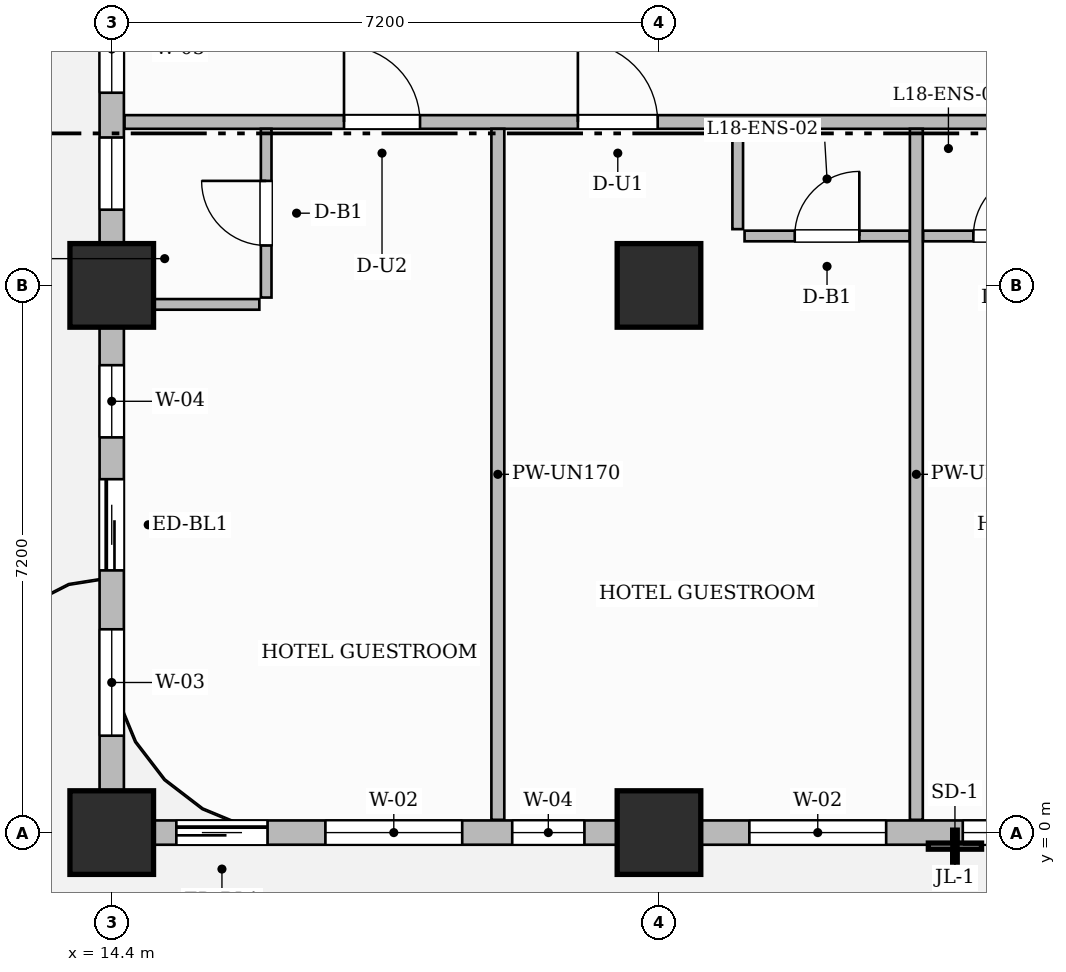
"""IFC4 building model, lengths in metres.
Left out: names, types, materials, properties, quantities, classifications, styles, units other than length and angle.
Written with IfcOpenShell. Run it as: python <this file> out.ifc"""

import sys

from ifc_helpers import new_model, si_unit, direction, frame, frame_2d, origin, origin_2d, place, context, subcontext, project, spatial, rectangle, extrude, source, transform, mapped, element, fill, save


model = new_model("IFC4")
c1 = context("Model", 3, precision=1e-05, world=origin(), true_north=direction((0.0, 1.0)))
c2 = subcontext(c1, "Body", "Model", "MODEL_VIEW")
j1 = project(units=[si_unit("LENGTHUNIT", "METRE"), si_unit("PLANEANGLEUNIT", "RADIAN")], contexts=[c1])
p1 = place(None, origin())
s1 = spatial("IfcSite", under=j1, at=p1, CompositionType="ELEMENT")
p2 = place(p1, origin())
s2 = spatial("IfcBuilding", under=s1, at=p2, CompositionType="ELEMENT")
p3 = place(p2, frame((0.0, 0.0, 76.8)))
s3 = spatial("IfcBuildingStorey", under=s2, at=p3, CompositionType="ELEMENT", Elevation=76.8)
m1 = source(origin(), c2, "Body", "SweptSolid", [
    extrude(rectangle(XDim=1.1, YDim=1.1, at=origin_2d()), origin(), (0.0, 0.0, 1.0), 3.7),
])
for number, where, z_axis, x_axis in (
    (1, (14.4, 0.0, 0.0), (0.0, 0.0, 1.0), (1.0, 0.0, 0.0)),
    (2, (14.4, 7.2, 0.0), (0.0, 0.0, 1.0), (1.0, 0.0, 0.0)),
    (3, (21.6, 0.0, 0.0), (0.0, 0.0, 1.0), (1.0, 0.0, 0.0)),
    (4, (21.6, 7.2, 0.0), (0.0, 0.0, 1.0), (1.0, 0.0, 0.0)),
):
    element("IfcColumn", number, at=place(p3, frame(where, z_axis=z_axis, x_axis=x_axis)), inside=s3, PredefinedType="COLUMN", context=c2, shape_type="MappedRepresentation", body=[
        mapped(m1, transform((0.0, 0.0, 0.0), scale=1.0)),
    ])
p4 = place(p3, frame((14.568, 9.35, 0.0), z_axis=(0.0, 0.0, 1.0), x_axis=(1.0, 0.0, 0.0)))
e5 = element("IfcWall", 5, at=p4, inside=s3, PredefinedType="PARTITIONING", context=c2, shape_type="SweptSolid", body=[
    extrude(rectangle(XDim=15.542, YDim=0.18, at=frame_2d((7.771, 0.0))), origin(), (0.0, 0.0, 1.0), 3.45),
])
p5 = place(p4, frame((2.888, 0.0, 0.0)))
e6 = element("IfcOpeningElement", 6, at=p5, cuts=e5, PredefinedType="OPENING", context=c2, shape_type="SweptSolid", body=[
    extrude(rectangle(XDim=1.0, YDim=2.2, at=frame_2d((0.5, 1.1))), frame((0.0, 0.1, 0.0), z_axis=(0.0, -1.0, 0.0), x_axis=(1.0, 0.0, 0.0)), (0.0, 0.0, 1.0), 0.2),
])
p6 = place(p4, frame((5.965, 0.0, 0.0)))
e7 = element("IfcOpeningElement", 7, at=p6, cuts=e5, PredefinedType="OPENING", context=c2, shape_type="SweptSolid", body=[
    extrude(rectangle(XDim=1.05, YDim=2.25, at=frame_2d((0.525, 1.125))), frame((0.0, 0.1, 0.0), z_axis=(0.0, -1.0, 0.0), x_axis=(1.0, 0.0, 0.0)), (0.0, 0.0, 1.0), 0.2),
])
p7 = place(p4, frame((13.7, 0.0, 0.0)))
e8 = element("IfcOpeningElement", 8, at=p7, cuts=e5, PredefinedType="OPENING", context=c2, shape_type="SweptSolid", body=[
    extrude(rectangle(XDim=1.0, YDim=2.2, at=frame_2d((0.5, 1.1))), frame((0.0, 0.1, 0.0), z_axis=(0.0, -1.0, 0.0), x_axis=(1.0, 0.0, 0.0)), (0.0, 0.0, 1.0), 0.2),
])
p8 = place(p3, frame((19.48, 0.168, 0.0), z_axis=(0.0, 0.0, 1.0), x_axis=(0.0, 1.0, 0.0)))
e9 = element("IfcWall", 9, at=p8, inside=s3, PredefinedType="PARTITIONING", context=c2, shape_type="SweptSolid", body=[
    extrude(rectangle(XDim=9.092, YDim=0.17, at=frame_2d((4.546, 0.0))), origin(), (0.0, 0.0, 1.0), 3.45),
])
p9 = place(p3, frame((24.986, 0.168, 0.0), z_axis=(0.0, 0.0, 1.0), x_axis=(0.0, 1.0, 0.0)))
e10 = element("IfcWall", 10, at=p9, inside=s3, PredefinedType="PARTITIONING", context=c2, shape_type="SweptSolid", body=[
    extrude(rectangle(XDim=9.092, YDim=0.17, at=frame_2d((4.546, 0.0))), origin(), (0.0, 0.0, 1.0), 3.075),
])
p10 = place(p3, frame((16.432, 7.04, 0.0), z_axis=(0.0, 0.0, 1.0), x_axis=(0.0, 1.0, 0.0)))
e11 = element("IfcWall", 11, at=p10, inside=s3, PredefinedType="PARTITIONING", context=c2, shape_type="SweptSolid", body=[
    extrude(rectangle(XDim=2.22, YDim=0.14, at=frame_2d((1.11, 0.0))), origin(), (0.0, 0.0, 1.0), 3.45),
])
p11 = place(p10, frame((0.685, 0.0, 0.0)))
e12 = element("IfcOpeningElement", 12, at=p11, cuts=e11, PredefinedType="OPENING", context=c2, shape_type="SweptSolid", body=[
    extrude(rectangle(XDim=0.85, YDim=2.1, at=frame_2d((0.425, 1.05))), frame((0.0, 0.08, 0.0), z_axis=(0.0, -1.0, 0.0), x_axis=(1.0, 0.0, 0.0)), (0.0, 0.0, 1.0), 0.16),
])
p12 = place(p3, frame((14.49, 6.95, 0.0), z_axis=(0.0, 0.0, 1.0), x_axis=(1.0, 0.0, 0.0)))
e13 = element("IfcWall", 13, at=p12, inside=s3, PredefinedType="PARTITIONING", context=c2, shape_type="SweptSolid", body=[
    extrude(rectangle(XDim=1.852, YDim=0.14, at=frame_2d((0.926, 0.0))), origin(), (0.0, 0.0, 1.0), 2.885),
])
p13 = place(p3, frame((22.636, 7.94, 0.0), z_axis=(0.0, 0.0, 1.0), x_axis=(0.0, 1.0, 0.0)))
e14 = element("IfcWall", 14, at=p13, inside=s3, PredefinedType="PARTITIONING", context=c2, shape_type="SweptSolid", body=[
    extrude(rectangle(XDim=1.32, YDim=0.14, at=frame_2d((0.66, 0.0))), origin(), (0.0, 0.0, 1.0), 3.45),
])
p14 = place(p3, frame((22.726, 7.85, 0.0), z_axis=(0.0, 0.0, 1.0), x_axis=(1.0, 0.0, 0.0)))
e15 = element("IfcWall", 15, at=p14, inside=s3, PredefinedType="PARTITIONING", context=c2, shape_type="SweptSolid", body=[
    extrude(rectangle(XDim=2.17, YDim=0.14, at=frame_2d((1.085, 0.0))), origin(), (0.0, 0.0, 1.0), 3.45),
])
p15 = place(p14, frame((0.66, 0.0, 0.0)))
e16 = element("IfcOpeningElement", 16, at=p15, cuts=e15, PredefinedType="OPENING", context=c2, shape_type="SweptSolid", body=[
    extrude(rectangle(XDim=0.85, YDim=2.1, at=frame_2d((0.425, 1.05))), frame((0.0, 0.08, 0.0), z_axis=(0.0, -1.0, 0.0), x_axis=(1.0, 0.0, 0.0)), (0.0, 0.0, 1.0), 0.16),
])
p16 = place(p3, frame((25.076, 7.85, 0.0), z_axis=(0.0, 0.0, 1.0), x_axis=(1.0, 0.0, 0.0)))
e17 = element("IfcWall", 17, at=p16, inside=s3, PredefinedType="PARTITIONING", context=c2, shape_type="SweptSolid", body=[
    extrude(rectangle(XDim=2.17, YDim=0.14, at=frame_2d((1.085, 0.0))), origin(), (0.0, 0.0, 1.0), 3.45),
])
p17 = place(p16, frame((0.66, 0.0, 0.0)))
e18 = element("IfcOpeningElement", 18, at=p17, cuts=e17, PredefinedType="OPENING", context=c2, shape_type="SweptSolid", body=[
    extrude(rectangle(XDim=0.85, YDim=2.1, at=frame_2d((0.425, 1.05))), frame((0.0, 0.08, 0.0), z_axis=(0.0, -1.0, 0.0), x_axis=(1.0, 0.0, 0.0)), (0.0, 0.0, 1.0), 0.16),
])
p18 = place(p3, frame((14.4, 0.0, 0.0), z_axis=(0.0, 0.0, 1.0), x_axis=(1.0, 0.0, 0.0)))
e19 = element("IfcWall", 19, at=p18, inside=s3, PredefinedType="SOLIDWALL", context=c2, shape_type="SweptSolid", body=[
    extrude(rectangle(XDim=43.2, YDim=0.32, at=frame_2d((21.6, 0.0))), origin(), (0.0, 0.0, 1.0), 2.885),
])
p19 = place(p18, frame((0.85, 0.0, 0.0)))
e20 = element("IfcOpeningElement", 20, at=p19, cuts=e19, PredefinedType="OPENING", context=c2, shape_type="SweptSolid", body=[
    extrude(rectangle(XDim=1.2, YDim=2.2, at=frame_2d((0.6, 1.1))), frame((0.0, 0.17, 0.0), z_axis=(0.0, -1.0, 0.0), x_axis=(1.0, 0.0, 0.0)), (0.0, 0.0, 1.0), 0.34),
])
p20 = place(p18, frame((2.811, 0.0, 0.8)))
e21 = element("IfcOpeningElement", 21, at=p20, cuts=e19, PredefinedType="OPENING", context=c2, shape_type="SweptSolid", body=[
    extrude(rectangle(XDim=1.8, YDim=1.85, at=frame_2d((0.9, 0.925))), frame((0.0, 0.17, 0.0), z_axis=(0.0, -1.0, 0.0), x_axis=(1.0, 0.0, 0.0)), (0.0, 0.0, 1.0), 0.34),
])
p21 = place(p18, frame((5.269, 0.0, 0.8)))
e22 = element("IfcOpeningElement", 22, at=p21, cuts=e19, PredefinedType="OPENING", context=c2, shape_type="SweptSolid", body=[
    extrude(rectangle(XDim=0.95, YDim=1.75, at=frame_2d((0.475, 0.875))), frame((0.0, 0.17, 0.0), z_axis=(0.0, -1.0, 0.0), x_axis=(1.0, 0.0, 0.0)), (0.0, 0.0, 1.0), 0.34),
])
p22 = place(p18, frame((8.389, 0.0, 0.8)))
e23 = element("IfcOpeningElement", 23, at=p22, cuts=e19, PredefinedType="OPENING", context=c2, shape_type="SweptSolid", body=[
    extrude(rectangle(XDim=1.8, YDim=1.85, at=frame_2d((0.9, 0.925))), frame((0.0, 0.17, 0.0), z_axis=(0.0, -1.0, 0.0), x_axis=(1.0, 0.0, 0.0)), (0.0, 0.0, 1.0), 0.34),
])
p23 = place(p18, frame((11.197, 0.0, 0.8)))
e24 = element("IfcOpeningElement", 24, at=p23, cuts=e19, PredefinedType="OPENING", context=c2, shape_type="SweptSolid", body=[
    extrude(rectangle(XDim=1.8, YDim=1.85, at=frame_2d((0.9, 0.925))), frame((0.0, 0.17, 0.0), z_axis=(0.0, -1.0, 0.0), x_axis=(1.0, 0.0, 0.0)), (0.0, 0.0, 1.0), 0.34),
])
p24 = place(p18, frame((16.804, 0.0, 0.8)))
e25 = element("IfcOpeningElement", 25, at=p24, cuts=e19, PredefinedType="OPENING", context=c2, shape_type="SweptSolid", body=[
    extrude(rectangle(XDim=1.8, YDim=1.85, at=frame_2d((0.9, 0.925))), frame((0.0, 0.17, 0.0), z_axis=(0.0, -1.0, 0.0), x_axis=(1.0, 0.0, 0.0)), (0.0, 0.0, 1.0), 0.34),
])
p25 = place(p18, frame((21.521, 0.0, 0.8)))
e26 = element("IfcOpeningElement", 26, at=p25, cuts=e19, PredefinedType="OPENING", context=c2, shape_type="SweptSolid", body=[
    extrude(rectangle(XDim=0.95, YDim=1.75, at=frame_2d((0.475, 0.875))), frame((0.0, 0.17, 0.0), z_axis=(0.0, -1.0, 0.0), x_axis=(1.0, 0.0, 0.0)), (0.0, 0.0, 1.0), 0.34),
])
p26 = place(p18, frame((23.904, 0.0, 0.8)))
e27 = element("IfcOpeningElement", 27, at=p26, cuts=e19, PredefinedType="OPENING", context=c2, shape_type="SweptSolid", body=[
    extrude(rectangle(XDim=1.8, YDim=1.85, at=frame_2d((0.9, 0.925))), frame((0.0, 0.17, 0.0), z_axis=(0.0, -1.0, 0.0), x_axis=(1.0, 0.0, 0.0)), (0.0, 0.0, 1.0), 0.34),
])
p27 = place(p18, frame((29.681, 0.0, 0.8)))
e28 = element("IfcOpeningElement", 28, at=p27, cuts=e19, PredefinedType="OPENING", context=c2, shape_type="SweptSolid", body=[
    extrude(rectangle(XDim=1.8, YDim=1.85, at=frame_2d((0.9, 0.925))), frame((0.0, 0.17, 0.0), z_axis=(0.0, -1.0, 0.0), x_axis=(1.0, 0.0, 0.0)), (0.0, 0.0, 1.0), 0.34),
])
p28 = place(p18, frame((32.327, 0.0, 0.8)))
e29 = element("IfcOpeningElement", 29, at=p28, cuts=e19, PredefinedType="OPENING", context=c2, shape_type="SweptSolid", body=[
    extrude(rectangle(XDim=1.8, YDim=1.85, at=frame_2d((0.9, 0.925))), frame((0.0, 0.17, 0.0), z_axis=(0.0, -1.0, 0.0), x_axis=(1.0, 0.0, 0.0)), (0.0, 0.0, 1.0), 0.34),
])
p29 = place(p18, frame((36.875, 0.0, 0.8)))
e30 = element("IfcOpeningElement", 30, at=p29, cuts=e19, PredefinedType="OPENING", context=c2, shape_type="SweptSolid", body=[
    extrude(rectangle(XDim=1.8, YDim=1.85, at=frame_2d((0.9, 0.925))), frame((0.0, 0.17, 0.0), z_axis=(0.0, -1.0, 0.0), x_axis=(1.0, 0.0, 0.0)), (0.0, 0.0, 1.0), 0.34),
])
p30 = place(p18, frame((39.925, 0.0, 0.8)))
e31 = element("IfcOpeningElement", 31, at=p30, cuts=e19, PredefinedType="OPENING", context=c2, shape_type="SweptSolid", body=[
    extrude(rectangle(XDim=1.8, YDim=1.85, at=frame_2d((0.9, 0.925))), frame((0.0, 0.17, 0.0), z_axis=(0.0, -1.0, 0.0), x_axis=(1.0, 0.0, 0.0)), (0.0, 0.0, 1.0), 0.34),
])
p31 = place(p3, frame((14.4, 0.05, 0.0), z_axis=(0.0, 0.0, 1.0), x_axis=(0.0, 1.0, 0.0)))
e32 = element("IfcWall", 32, at=p31, inside=s3, PredefinedType="SOLIDWALL", context=c2, shape_type="SweptSolid", body=[
    extrude(rectangle(XDim=20.6, YDim=0.32, at=frame_2d((10.3, 0.0))), origin(), (0.0, 0.0, 1.0), 2.885),
])
p32 = place(p31, frame((3.4, 0.0, 0.0)))
e33 = element("IfcOpeningElement", 33, at=p32, cuts=e32, PredefinedType="OPENING", context=c2, shape_type="SweptSolid", body=[
    extrude(rectangle(XDim=1.2, YDim=2.2, at=frame_2d((0.6, 1.1))), frame((0.0, 0.17, 0.0), z_axis=(0.0, -1.0, 0.0), x_axis=(1.0, 0.0, 0.0)), (0.0, 0.0, 1.0), 0.34),
])
p33 = place(p31, frame((1.225, 0.0, 0.8)))
e34 = element("IfcOpeningElement", 34, at=p33, cuts=e32, PredefinedType="OPENING", context=c2, shape_type="SweptSolid", body=[
    extrude(rectangle(XDim=1.4, YDim=1.85, at=frame_2d((0.7, 0.925))), frame((0.0, 0.17, 0.0), z_axis=(0.0, -1.0, 0.0), x_axis=(1.0, 0.0, 0.0)), (0.0, 0.0, 1.0), 0.34),
])
p34 = place(p31, frame((5.15, 0.0, 0.8)))
e35 = element("IfcOpeningElement", 35, at=p34, cuts=e32, PredefinedType="OPENING", context=c2, shape_type="SweptSolid", body=[
    extrude(rectangle(XDim=0.95, YDim=1.75, at=frame_2d((0.475, 0.875))), frame((0.0, 0.17, 0.0), z_axis=(0.0, -1.0, 0.0), x_axis=(1.0, 0.0, 0.0)), (0.0, 0.0, 1.0), 0.34),
])
p35 = place(p31, frame((8.146, 0.0, 0.8)))
e36 = element("IfcOpeningElement", 36, at=p35, cuts=e32, PredefinedType="OPENING", context=c2, shape_type="SweptSolid", body=[
    extrude(rectangle(XDim=0.95, YDim=1.75, at=frame_2d((0.475, 0.875))), frame((0.0, 0.17, 0.0), z_axis=(0.0, -1.0, 0.0), x_axis=(1.0, 0.0, 0.0)), (0.0, 0.0, 1.0), 0.34),
])
p36 = place(p31, frame((9.685, 0.0, 0.8)))
e37 = element("IfcOpeningElement", 37, at=p36, cuts=e32, PredefinedType="OPENING", context=c2, shape_type="SweptSolid", body=[
    extrude(rectangle(XDim=1.15, YDim=1.8, at=frame_2d((0.575, 0.9))), frame((0.0, 0.17, 0.0), z_axis=(0.0, -1.0, 0.0), x_axis=(1.0, 0.0, 0.0)), (0.0, 0.0, 1.0), 0.34),
])
p37 = place(p31, frame((11.689, 0.0, 0.8)))
e38 = element("IfcOpeningElement", 38, at=p37, cuts=e32, PredefinedType="OPENING", context=c2, shape_type="SweptSolid", body=[
    extrude(rectangle(XDim=1.4, YDim=1.85, at=frame_2d((0.7, 0.925))), frame((0.0, 0.17, 0.0), z_axis=(0.0, -1.0, 0.0), x_axis=(1.0, 0.0, 0.0)), (0.0, 0.0, 1.0), 0.34),
])
p38 = place(p31, frame((16.79, 0.0, 0.8)))
e39 = element("IfcOpeningElement", 39, at=p38, cuts=e32, PredefinedType="OPENING", context=c2, shape_type="SweptSolid", body=[
    extrude(rectangle(XDim=1.8, YDim=1.85, at=frame_2d((0.9, 0.925))), frame((0.0, 0.17, 0.0), z_axis=(0.0, -1.0, 0.0), x_axis=(1.0, 0.0, 0.0)), (0.0, 0.0, 1.0), 0.34),
])
m2 = source(origin(), c2, "Body", "SweptSolid", [
    extrude(rectangle(XDim=0.85, YDim=2.1, at=frame_2d((0.425, 1.05))), frame((0.0, 0.025, 0.0), z_axis=(0.0, -1.0, 0.0), x_axis=(1.0, 0.0, 0.0)), (0.0, 0.0, 1.0), 0.05),
])
p39 = place(p11, origin())
e40 = element("IfcDoor", 40, at=p39, inside=s3, OperationType="SINGLE_SWING_RIGHT", PredefinedType="DOOR", context=c2, shape_type="MappedRepresentation", body=[
    mapped(m2, transform((0.0, 0.0, 0.0), scale=1.0)),
])
fill(e12, e40)
m3 = source(origin(), c2, "Body", "SweptSolid", [
    extrude(rectangle(XDim=1.0, YDim=2.2, at=frame_2d((0.5, 1.1))), frame((0.0, 0.025, 0.0), z_axis=(0.0, -1.0, 0.0), x_axis=(1.0, 0.0, 0.0)), (0.0, 0.0, 1.0), 0.05),
])
p40 = place(p5, origin())
e41 = element("IfcDoor", 41, at=p40, inside=s3, OperationType="SINGLE_SWING_LEFT", PredefinedType="DOOR", context=c2, shape_type="MappedRepresentation", body=[
    mapped(m3, transform((0.0, 0.0, 0.0), scale=1.0)),
])
fill(e6, e41)
p41 = place(p15, origin())
e42 = element("IfcDoor", 42, at=p41, inside=s3, OperationType="SINGLE_SWING_RIGHT", PredefinedType="DOOR", context=c2, shape_type="MappedRepresentation", body=[
    mapped(m2, transform((0.0, 0.0, 0.0), scale=1.0)),
])
fill(e16, e42)
m4 = source(origin(), c2, "Body", "SweptSolid", [
    extrude(rectangle(XDim=1.05, YDim=2.25, at=frame_2d((0.525, 1.125))), frame((0.0, 0.025, 0.0), z_axis=(0.0, -1.0, 0.0), x_axis=(1.0, 0.0, 0.0)), (0.0, 0.0, 1.0), 0.05),
])
p42 = place(p6, origin())
e43 = element("IfcDoor", 43, at=p42, inside=s3, OperationType="SINGLE_SWING_LEFT", PredefinedType="DOOR", context=c2, shape_type="MappedRepresentation", body=[
    mapped(m4, transform((0.0, 0.0, 0.0), scale=1.0)),
])
fill(e7, e43)
p43 = place(p17, origin())
e44 = element("IfcDoor", 44, at=p43, inside=s3, OperationType="SINGLE_SWING_RIGHT", PredefinedType="DOOR", context=c2, shape_type="MappedRepresentation", body=[
    mapped(m2, transform((0.0, 0.0, 0.0), scale=1.0)),
])
fill(e18, e44)
m5 = source(origin(), c2, "Body", "SweptSolid", [
    extrude(rectangle(XDim=1.2, YDim=2.2, at=frame_2d((0.6, 1.1))), frame((0.0, 0.025, 0.0), z_axis=(0.0, -1.0, 0.0), x_axis=(1.0, 0.0, 0.0)), (0.0, 0.0, 1.0), 0.05),
])
p44 = place(p19, origin())
e45 = element("IfcDoor", 45, at=p44, inside=s3, OperationType="SLIDING_TO_LEFT", PredefinedType="DOOR", context=c2, shape_type="MappedRepresentation", body=[
    mapped(m5, transform((0.0, 0.0, 0.0), scale=1.0)),
])
fill(e20, e45)
p45 = place(p32, origin())
e46 = element("IfcDoor", 46, at=p45, inside=s3, OperationType="SLIDING_TO_LEFT", PredefinedType="DOOR", context=c2, shape_type="MappedRepresentation", body=[
    mapped(m5, transform((0.0, 0.0, 0.0), scale=1.0)),
])
fill(e33, e46)
m6 = source(origin(), c2, "Body", "SweptSolid", [
    extrude(rectangle(XDim=1.8, YDim=1.85, at=frame_2d((0.9, 0.925))), frame((0.0, 0.03, 0.0), z_axis=(0.0, -1.0, 0.0), x_axis=(1.0, 0.0, 0.0)), (0.0, 0.0, 1.0), 0.06),
])
p46 = place(p20, origin())
e47 = element("IfcWindow", 47, at=p46, inside=s3, PartitioningType="DOUBLE_PANEL_VERTICAL", PredefinedType="WINDOW", context=c2, shape_type="MappedRepresentation", body=[
    mapped(m6, transform((0.0, 0.0, 0.0), scale=1.0)),
])
fill(e21, e47)
m7 = source(origin(), c2, "Body", "SweptSolid", [
    extrude(rectangle(XDim=0.95, YDim=1.75, at=frame_2d((0.475, 0.875))), frame((0.0, 0.03, 0.0), z_axis=(0.0, -1.0, 0.0), x_axis=(1.0, 0.0, 0.0)), (0.0, 0.0, 1.0), 0.06),
])
p47 = place(p21, origin())
e48 = element("IfcWindow", 48, at=p47, inside=s3, PartitioningType="SINGLE_PANEL", PredefinedType="WINDOW", context=c2, shape_type="MappedRepresentation", body=[
    mapped(m7, transform((0.0, 0.0, 0.0), scale=1.0)),
])
fill(e22, e48)
p48 = place(p22, origin())
e49 = element("IfcWindow", 49, at=p48, inside=s3, PartitioningType="DOUBLE_PANEL_VERTICAL", PredefinedType="WINDOW", context=c2, shape_type="MappedRepresentation", body=[
    mapped(m6, transform((0.0, 0.0, 0.0), scale=1.0)),
])
fill(e23, e49)
p49 = place(p23, origin())
e50 = element("IfcWindow", 50, at=p49, inside=s3, PartitioningType="DOUBLE_PANEL_VERTICAL", PredefinedType="WINDOW", context=c2, shape_type="MappedRepresentation", body=[
    mapped(m6, transform((0.0, 0.0, 0.0), scale=1.0)),
])
fill(e24, e50)
m8 = source(origin(), c2, "Body", "SweptSolid", [
    extrude(rectangle(XDim=1.4, YDim=1.85, at=frame_2d((0.7, 0.925))), frame((0.0, 0.03, 0.0), z_axis=(0.0, -1.0, 0.0), x_axis=(1.0, 0.0, 0.0)), (0.0, 0.0, 1.0), 0.06),
])
p50 = place(p33, origin())
e51 = element("IfcWindow", 51, at=p50, inside=s3, PartitioningType="SINGLE_PANEL", PredefinedType="WINDOW", context=c2, shape_type="MappedRepresentation", body=[
    mapped(m8, transform((0.0, 0.0, 0.0), scale=1.0)),
])
fill(e34, e51)
p51 = place(p34, origin())
e52 = element("IfcWindow", 52, at=p51, inside=s3, PartitioningType="SINGLE_PANEL", PredefinedType="WINDOW", context=c2, shape_type="MappedRepresentation", body=[
    mapped(m7, transform((0.0, 0.0, 0.0), scale=1.0)),
])
fill(e35, e52)
p52 = place(p35, origin())
e53 = element("IfcWindow", 53, at=p52, inside=s3, PartitioningType="SINGLE_PANEL", PredefinedType="WINDOW", context=c2, shape_type="MappedRepresentation", body=[
    mapped(m7, transform((0.0, 0.0, 0.0), scale=1.0)),
])
fill(e36, e53)
m9 = source(origin(), c2, "Body", "SweptSolid", [
    extrude(rectangle(XDim=1.15, YDim=1.8, at=frame_2d((0.575, 0.9))), frame((0.0, 0.03, 0.0), z_axis=(0.0, -1.0, 0.0), x_axis=(1.0, 0.0, 0.0)), (0.0, 0.0, 1.0), 0.06),
])
p53 = place(p36, origin())
e54 = element("IfcWindow", 54, at=p53, inside=s3, PartitioningType="SINGLE_PANEL", PredefinedType="WINDOW", context=c2, shape_type="MappedRepresentation", body=[
    mapped(m9, transform((0.0, 0.0, 0.0), scale=1.0)),
])
fill(e37, e54)
save(model, sys.argv[1])
